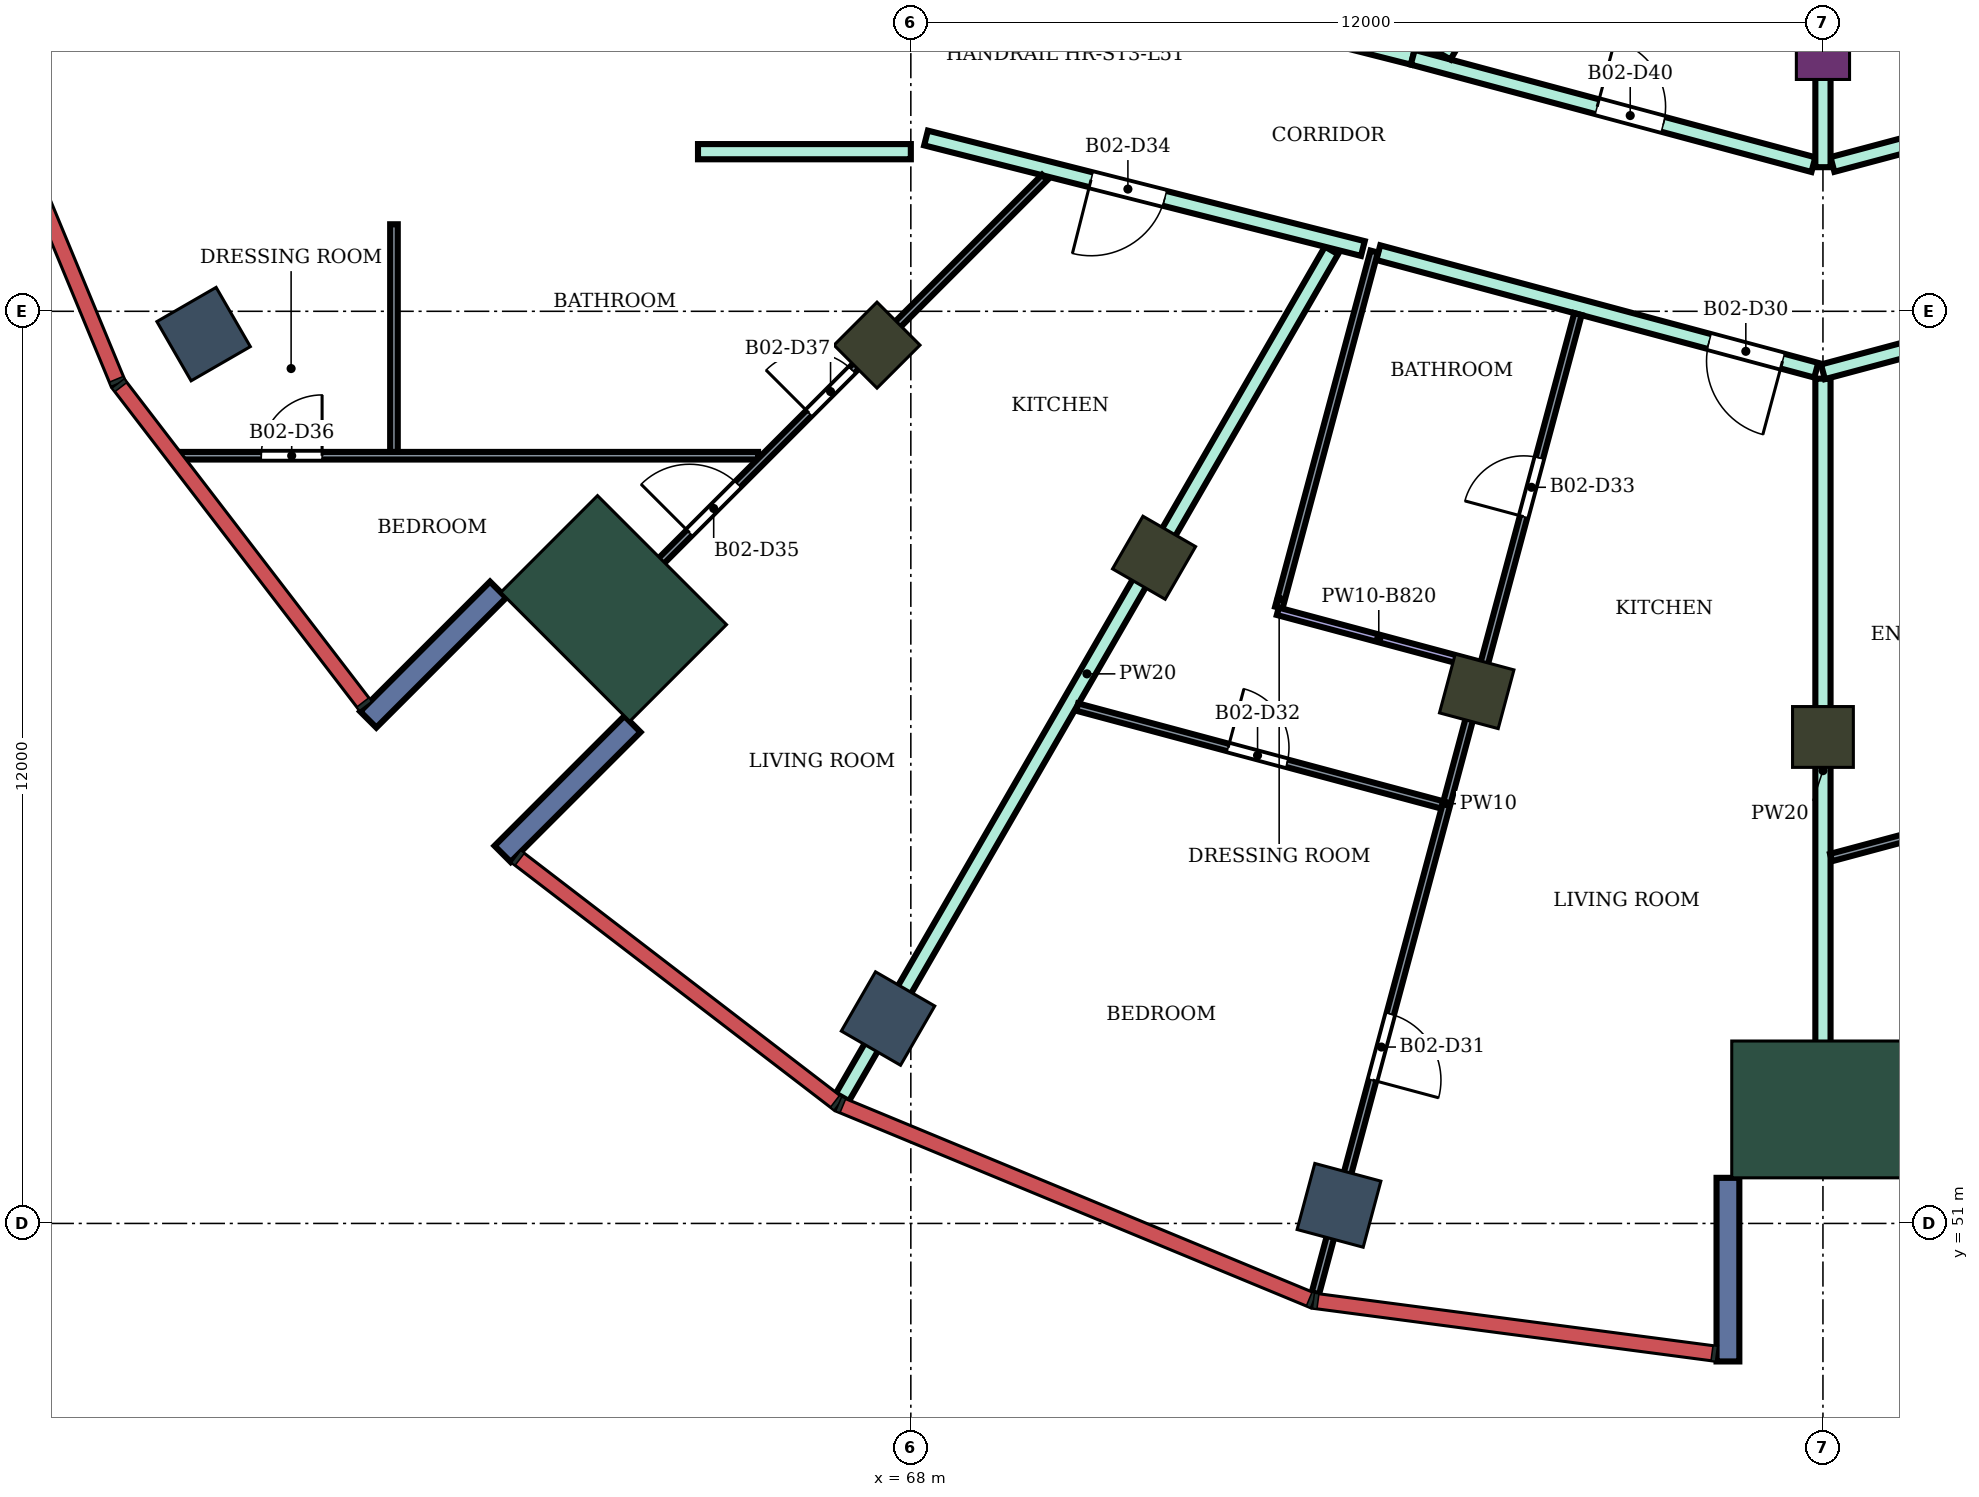
"""IFC4 building model, lengths in metres.
Left out: names, types, materials, properties, quantities, classifications, styles, units other than length and angle.
Written with IfcOpenShell. Run it as: python <this file> out.ifc"""

import sys

from ifc_helpers import new_model, si_unit, direction, frame, frame_2d, origin, origin_2d, place, context, subcontext, project, spatial, rectangle, extrude, element, fill, save


model = new_model("IFC4")
c1 = context("Model", 3, precision=1e-05, world=origin(), true_north=direction((0.0, 1.0)))
c2 = subcontext(c1, "Body", "Model", "MODEL_VIEW")
j1 = project(units=[si_unit("LENGTHUNIT", "METRE"), si_unit("PLANEANGLEUNIT", "RADIAN")], contexts=[c1])
p1 = place(None, origin())
s1 = spatial("IfcSite", under=j1, at=p1, CompositionType="ELEMENT")
p2 = place(p1, origin())
s2 = spatial("IfcBuilding", under=s1, at=p2, CompositionType="ELEMENT")
p3 = place(p2, frame((0.0, 0.0, 220.9)))
s3 = spatial("IfcBuildingStorey", under=s2, at=p3, CompositionType="ELEMENT", Elevation=220.9)
for number, where, z_axis, x_axis in (
    (1, (58.696, 62.7, 0.0), (0.0, 0.0, 1.0), (-0.866, -0.5, 0.0)),
    (2, (67.7, 53.696, 0.0), (0.0, 0.0, 1.0), (-0.5, -0.866, 0.0)),
    (3, (73.633, 51.238, 0.0), (0.0, 0.0, 1.0), (-0.259, -0.966, 0.0)),
):
    element("IfcColumn", number, at=place(p3, frame(where, z_axis=z_axis, x_axis=x_axis)), inside=s3, PredefinedType="COLUMN", context=c2, shape_type="SweptSolid", body=[
        extrude(rectangle(XDim=0.9, YDim=0.9, at=origin_2d()), origin(), (0.0, 0.0, 1.0), 4.2),
    ])
for number, where, z_axis, x_axis in (
    (4, (67.555, 62.555, 0.0), (0.0, 0.0, 1.0), (-0.707, -0.707, 0.0)),
    (5, (71.2, 59.758, 0.0), (0.0, 0.0, 1.0), (-0.5, -0.866, 0.0)),
    (6, (75.445, 58.0, 0.0), (0.0, 0.0, 1.0), (-0.259, -0.966, 0.0)),
    (7, (80.0, 57.4, 0.0), (0.0, 0.0, 1.0), (0.0, -1.0, 0.0)),
):
    element("IfcColumn", number, at=place(p3, frame(where, z_axis=z_axis, x_axis=x_axis)), inside=s3, PredefinedType="COLUMN", context=c2, shape_type="SweptSolid", body=[
        extrude(rectangle(XDim=0.8, YDim=0.8, at=origin_2d()), origin(), (0.0, 0.0, 1.0), 4.2),
    ])
p4 = place(p3, frame((80.0, 66.4, 0.0), z_axis=(0.0, 0.0, 1.0), x_axis=(0.0, -1.0, 0.0)))
e8 = element("IfcColumn", 8, at=p4, inside=s3, PredefinedType="COLUMN", context=c2, shape_type="SweptSolid", body=[
    extrude(rectangle(XDim=0.7, YDim=0.7, at=origin_2d()), origin(), (0.0, 0.0, 1.0), 4.2),
])
for number, where, z_axis, x_axis in (
    (9, (64.09, 59.09, 0.0), (0.0, 0.0, 1.0), (-0.707, -0.707, 0.0)),
    (10, (80.0, 52.5, 0.0), (0.0, 0.0, 1.0), (0.0, -1.0, 0.0)),
):
    element("IfcColumn", number, at=place(p3, frame(where, z_axis=z_axis, x_axis=x_axis)), inside=s3, PredefinedType="COLUMN", context=c2, shape_type="SweptSolid", body=[
        extrude(rectangle(XDim=1.8, YDim=2.4, at=origin_2d()), origin(), (0.0, 0.0, 1.0), 4.2),
    ])
for number, where, z_axis, x_axis in (
    (11, (62.57, 59.338, 0.0), (0.0, 0.0, 1.0), (-0.707, -0.707, 0.0)),
    (12, (64.338, 57.57, 0.0), (0.0, 0.0, 1.0), (-0.707, -0.707, 0.0)),
    (13, (78.75, 51.6, 0.0), (0.0, 0.0, 1.0), (0.0, -1.0, 0.0)),
):
    element("IfcWall", number, at=place(p3, frame(where, z_axis=z_axis, x_axis=x_axis)), inside=s3, PredefinedType="NOTDEFINED", context=c2, shape_type="SweptSolid", body=[
        extrude(rectangle(XDim=2.416, YDim=0.3, at=frame_2d((1.208, 0.0))), origin(), (0.0, 0.0, 1.0), 4.2),
    ])
p5 = place(p3, frame((65.2, 65.1, 0.0), z_axis=(0.0, 0.0, 1.0), x_axis=(1.0, 0.0, 0.0)))
e14 = element("IfcWall", 14, at=p5, inside=s3, PredefinedType="PARTITIONING", context=c2, shape_type="SweptSolid", body=[
    extrude(rectangle(XDim=2.8, YDim=0.2, at=frame_2d((1.4, 0.0))), origin(), (0.0, 0.0, 1.0), 3.75),
])
p6 = place(p3, frame((67.1, 52.659, 0.0), z_axis=(0.0, 0.0, 1.0), x_axis=(0.500128690501, 0.865951091539, 0.0)))
e15 = element("IfcWall", 15, at=p6, inside=s3, PredefinedType="PARTITIONING", context=c2, shape_type="SweptSolid", body=[
    extrude(rectangle(XDim=12.866, YDim=0.2, at=frame_2d((6.433, 0.0))), origin(), (0.0, 0.0, 1.0), 3.75),
])
p7 = place(p3, frame((68.2, 65.28, 0.0), z_axis=(0.0, 0.0, 1.0), x_axis=(0.969450596516, -0.245286650503, 0.0)))
e16 = element("IfcWall", 16, at=p7, inside=s3, PredefinedType="PARTITIONING", context=c2, shape_type="SweptSolid", body=[
    extrude(rectangle(XDim=5.928, YDim=0.2, at=frame_2d((2.964, 0.0))), origin(), (0.0, 0.0, 1.0), 3.75),
])
p8 = place(p7, frame((2.24, 0.0, 0.0)))
e17 = element("IfcOpeningElement", 17, at=p8, cuts=e16, PredefinedType="OPENING", context=c2, shape_type="SweptSolid", body=[
    extrude(rectangle(XDim=1.0, YDim=2.1, at=frame_2d((0.5, 1.05))), frame((0.0, 0.11, 0.0), z_axis=(0.0, -1.0, 0.0), x_axis=(1.0, 0.0, 0.0)), (0.0, 0.0, 1.0), 0.22),
])
p9 = place(p3, frame((72.1, 66.975, 0.0), z_axis=(0.0, 0.0, 1.0), x_axis=(0.969471314457, -0.245204752086, 0.0)))
e18 = element("IfcWall", 18, at=p9, inside=s3, PredefinedType="PARTITIONING", context=c2, shape_type="SweptSolid", body=[
    extrude(rectangle(XDim=2.582, YDim=0.2, at=frame_2d((1.291, 0.0))), origin(), (0.0, 0.0, 1.0), 3.75),
])
p10 = place(p9, frame((0.841, 0.0, 0.0)))
e19 = element("IfcOpeningElement", 19, at=p10, cuts=e18, PredefinedType="OPENING", context=c2, shape_type="SweptSolid", body=[
    extrude(rectangle(XDim=0.9, YDim=2.1, at=frame_2d((0.45, 1.05))), frame((0.0, 0.11, 0.0), z_axis=(0.0, -1.0, 0.0), x_axis=(1.0, 0.0, 0.0)), (0.0, 0.0, 1.0), 0.22),
])
p11 = place(p3, frame((74.15, 63.772, 0.0), z_axis=(0.0, 0.0, 1.0), x_axis=(0.965807109237, -0.259261697417, 0.0)))
e20 = element("IfcWall", 20, at=p11, inside=s3, PredefinedType="PARTITIONING", context=c2, shape_type="SweptSolid", body=[
    extrude(rectangle(XDim=5.967, YDim=0.2, at=frame_2d((2.983, 0.0))), origin(), (0.0, 0.0, 1.0), 3.75),
])
p12 = place(p11, frame((4.507, 0.0, 0.0)))
e21 = element("IfcOpeningElement", 21, at=p12, cuts=e20, PredefinedType="OPENING", context=c2, shape_type="SweptSolid", body=[
    extrude(rectangle(XDim=1.0, YDim=2.1, at=frame_2d((0.5, 1.05))), frame((0.0, 0.11, 0.0), z_axis=(0.0, -1.0, 0.0), x_axis=(1.0, 0.0, 0.0)), (0.0, 0.0, 1.0), 0.22),
])
p13 = place(p3, frame((74.603, 66.342, 0.0), z_axis=(0.0, 0.0, 1.0), x_axis=(0.965920893652, -0.258837453254, 0.0)))
e22 = element("IfcWall", 22, at=p13, inside=s3, PredefinedType="PARTITIONING", context=c2, shape_type="SweptSolid", body=[
    extrude(rectangle(XDim=5.458, YDim=0.2, at=frame_2d((2.729, 0.0))), origin(), (0.0, 0.0, 1.0), 3.75),
])
p14 = place(p13, frame((2.512, 0.0, 0.0)))
e23 = element("IfcOpeningElement", 23, at=p14, cuts=e22, PredefinedType="OPENING", context=c2, shape_type="SweptSolid", body=[
    extrude(rectangle(XDim=0.9, YDim=2.1, at=frame_2d((0.45, 1.05))), frame((0.0, 0.11, 0.0), z_axis=(0.0, -1.0, 0.0), x_axis=(1.0, 0.0, 0.0)), (0.0, 0.0, 1.0), 0.22),
])
p15 = place(p3, frame((75.014, 66.362, 0.0), z_axis=(0.0, 0.0, 1.0), x_axis=(0.500143511652, 0.865942531438, 0.0)))
e24 = element("IfcWall", 24, at=p15, inside=s3, PredefinedType="PARTITIONING", context=c2, shape_type="SweptSolid", body=[
    extrude(rectangle(XDim=2.275, YDim=0.2, at=frame_2d((1.138, 0.0))), origin(), (0.0, 0.0, 1.0), 3.75),
])
p16 = place(p3, frame((80.125, 64.932, 0.0), z_axis=(0.0, 0.0, 1.0), x_axis=(0.966236955806, 0.257655089674, 0.0)))
e25 = element("IfcWall", 25, at=p16, inside=s3, PredefinedType="PARTITIONING", context=c2, shape_type="SweptSolid", body=[
    extrude(rectangle(XDim=8.039, YDim=0.2, at=frame_2d((4.02, 0.0))), origin(), (0.0, 0.0, 1.0), 3.75),
])
p17 = place(p16, frame((6.298, 0.0, 0.0)))
e26 = element("IfcOpeningElement", 26, at=p17, cuts=e25, PredefinedType="OPENING", context=c2, shape_type="SweptSolid", body=[
    extrude(rectangle(XDim=0.9, YDim=2.1, at=frame_2d((0.45, 1.05))), frame((0.0, 0.11, 0.0), z_axis=(0.0, -1.0, 0.0), x_axis=(1.0, 0.0, 0.0)), (0.0, 0.0, 1.0), 0.22),
])
p18 = place(p16, frame((2.045, 0.0, 0.0)))
e27 = element("IfcOpeningElement", 27, at=p18, cuts=e25, PredefinedType="OPENING", context=c2, shape_type="SweptSolid", body=[
    extrude(rectangle(XDim=0.9, YDim=2.1, at=frame_2d((0.45, 1.05))), frame((0.0, 0.11, 0.0), z_axis=(0.0, -1.0, 0.0), x_axis=(1.0, 0.0, 0.0)), (0.0, 0.0, 1.0), 0.22),
])
p19 = place(p3, frame((80.0, 51.8, 0.0), z_axis=(0.0, 0.0, 1.0), x_axis=(0.0, 1.0, 0.0)))
e28 = element("IfcWall", 28, at=p19, inside=s3, PredefinedType="PARTITIONING", context=c2, shape_type="SweptSolid", body=[
    extrude(rectangle(XDim=10.314, YDim=0.2, at=frame_2d((5.157, 0.0))), origin(), (0.0, 0.0, 1.0), 3.75),
])
p20 = place(p3, frame((80.0, 62.204, 0.0), z_axis=(0.0, 0.0, 1.0), x_axis=(0.965938139786, 0.258773086132, 0.0)))
e29 = element("IfcWall", 29, at=p20, inside=s3, PredefinedType="PARTITIONING", context=c2, shape_type="SweptSolid", body=[
    extrude(rectangle(XDim=6.266, YDim=0.2, at=frame_2d((3.133, 0.0))), origin(), (0.0, 0.0, 1.0), 3.75),
])
p21 = place(p3, frame((80.0, 64.896, 0.0), z_axis=(0.0, 0.0, 1.0), x_axis=(0.0, 1.0, 0.0)))
e30 = element("IfcWall", 30, at=p21, inside=s3, PredefinedType="PARTITIONING", context=c2, shape_type="SweptSolid", body=[
    extrude(rectangle(XDim=2.405, YDim=0.2, at=frame_2d((1.203, 0.0))), origin(), (0.0, 0.0, 1.0), 3.75),
])
p22 = place(p3, frame((58.379, 61.1, 0.0), z_axis=(0.0, 0.0, 1.0), x_axis=(1.0, 0.0, 0.0)))
e31 = element("IfcWall", 31, at=p22, inside=s3, PredefinedType="PARTITIONING", context=c2, shape_type="SweptSolid", body=[
    extrude(rectangle(XDim=7.611, YDim=0.1, at=frame_2d((3.806, 0.0))), origin(), (0.0, 0.0, 1.0), 3.75),
])
p23 = place(p22, frame((1.075, 0.0, 0.0)))
e32 = element("IfcOpeningElement", 32, at=p23, cuts=e31, PredefinedType="OPENING", context=c2, shape_type="SweptSolid", body=[
    extrude(rectangle(XDim=0.8, YDim=2.1, at=frame_2d((0.4, 1.05))), frame((0.0, 0.06, 0.0), z_axis=(0.0, -1.0, 0.0), x_axis=(1.0, 0.0, 0.0)), (0.0, 0.0, 1.0), 0.12),
])
p24 = place(p3, frame((61.2, 61.15, 0.0), z_axis=(0.0, 0.0, 1.0), x_axis=(0.0, 1.0, 0.0)))
e33 = element("IfcWall", 33, at=p24, inside=s3, PredefinedType="PARTITIONING", context=c2, shape_type="SweptSolid", body=[
    extrude(rectangle(XDim=2.995, YDim=0.1, at=frame_2d((1.498, 0.0))), origin(), (0.0, 0.0, 1.0), 3.75),
])
p25 = place(p3, frame((63.596, 58.596, 0.0), z_axis=(0.0, 0.0, 1.0), x_axis=(0.707106781187, 0.707106781187, 0.0)))
e34 = element("IfcWall", 34, at=p25, inside=s3, PredefinedType="PARTITIONING", context=c2, shape_type="SweptSolid", body=[
    extrude(rectangle(XDim=8.719, YDim=0.1, at=frame_2d((4.359, 0.0))), origin(), (0.0, 0.0, 1.0), 3.75),
])
p26 = place(p25, frame((2.111, 0.0, 0.0)))
e35 = element("IfcOpeningElement", 35, at=p26, cuts=e34, PredefinedType="OPENING", context=c2, shape_type="SweptSolid", body=[
    extrude(rectangle(XDim=0.9, YDim=2.1, at=frame_2d((0.45, 1.05))), frame((0.0, 0.06, 0.0), z_axis=(0.0, -1.0, 0.0), x_axis=(1.0, 0.0, 0.0)), (0.0, 0.0, 1.0), 0.12),
])
p27 = place(p25, frame((4.335, 0.0, 0.0)))
e36 = element("IfcOpeningElement", 36, at=p27, cuts=e34, PredefinedType="OPENING", context=c2, shape_type="SweptSolid", body=[
    extrude(rectangle(XDim=0.8, YDim=2.1, at=frame_2d((0.4, 1.05))), frame((0.0, 0.06, 0.0), z_axis=(0.0, -1.0, 0.0), x_axis=(1.0, 0.0, 0.0)), (0.0, 0.0, 1.0), 0.12),
])
p28 = place(p3, frame((70.188, 57.793, 0.0), z_axis=(0.0, 0.0, 1.0), x_axis=(0.965913212633, -0.258866115322, 0.0)))
e37 = element("IfcWall", 37, at=p28, inside=s3, PredefinedType="PARTITIONING", context=c2, shape_type="SweptSolid", body=[
    extrude(rectangle(XDim=4.974, YDim=0.1, at=frame_2d((2.487, 0.0))), origin(), (0.0, 0.0, 1.0), 3.75),
])
p29 = place(p28, frame((2.057, 0.0, 0.0)))
e38 = element("IfcOpeningElement", 38, at=p29, cuts=e37, PredefinedType="OPENING", context=c2, shape_type="SweptSolid", body=[
    extrude(rectangle(XDim=0.8, YDim=2.1, at=frame_2d((0.4, 1.05))), frame((0.0, 0.06, 0.0), z_axis=(0.0, -1.0, 0.0), x_axis=(1.0, 0.0, 0.0)), (0.0, 0.0, 1.0), 0.12),
])
p30 = place(p3, frame((72.841, 59.101, 0.0), z_axis=(0.0, 0.0, 1.0), x_axis=(0.258799830155, 0.965930974714, 0.0)))
e39 = element("IfcWall", 39, at=p30, inside=s3, PredefinedType="PARTITIONING", context=c2, shape_type="SweptSolid", body=[
    extrude(rectangle(XDim=4.85, YDim=0.1, at=frame_2d((2.425, 0.0))), origin(), (0.0, 0.0, 1.0), 3.75),
])
p31 = place(p3, frame((72.828, 59.053, 0.0), z_axis=(0.0, 0.0, 1.0), x_axis=(0.965899705866, -0.25891650818, 0.0)))
e40 = element("IfcWall", 40, at=p31, inside=s3, PredefinedType="PARTITIONING", context=c2, shape_type="SweptSolid", body=[
    extrude(rectangle(XDim=2.75, YDim=0.1, at=frame_2d((1.375, 0.0))), origin(), (0.0, 0.0, 1.0), 3.38),
])
p32 = place(p3, frame((73.323, 50.081, 0.0), z_axis=(0.0, 0.0, 1.0), x_axis=(0.258961147073, 0.965887738977, 0.0)))
e41 = element("IfcWall", 41, at=p32, inside=s3, PredefinedType="PARTITIONING", context=c2, shape_type="SweptSolid", body=[
    extrude(rectangle(XDim=13.338, YDim=0.1, at=frame_2d((6.669, 0.0))), origin(), (0.0, 0.0, 1.0), 3.75),
])
p33 = place(p32, frame((2.904, 0.0, 0.0)))
e42 = element("IfcOpeningElement", 42, at=p33, cuts=e41, PredefinedType="OPENING", context=c2, shape_type="SweptSolid", body=[
    extrude(rectangle(XDim=0.9, YDim=2.1, at=frame_2d((0.45, 1.05))), frame((0.0, 0.06, 0.0), z_axis=(0.0, -1.0, 0.0), x_axis=(1.0, 0.0, 0.0)), (0.0, 0.0, 1.0), 0.12),
])
p34 = place(p32, frame((10.578, 0.0, 0.0)))
e43 = element("IfcOpeningElement", 43, at=p34, cuts=e41, PredefinedType="OPENING", context=c2, shape_type="SweptSolid", body=[
    extrude(rectangle(XDim=0.8, YDim=2.1, at=frame_2d((0.4, 1.05))), frame((0.0, 0.06, 0.0), z_axis=(0.0, -1.0, 0.0), x_axis=(1.0, 0.0, 0.0)), (0.0, 0.0, 1.0), 0.12),
])
p35 = place(p3, frame((80.106, 55.813, 0.0), z_axis=(0.0, 0.0, 1.0), x_axis=(0.965936279421, 0.25878003033, 0.0)))
e44 = element("IfcWall", 44, at=p35, inside=s3, PredefinedType="PARTITIONING", context=c2, shape_type="SweptSolid", body=[
    extrude(rectangle(XDim=4.813, YDim=0.1, at=frame_2d((2.407, 0.0))), origin(), (0.0, 0.0, 1.0), 3.75),
])
p36 = place(p35, frame((1.977, 0.0, 0.0)))
e45 = element("IfcOpeningElement", 45, at=p36, cuts=e44, PredefinedType="OPENING", context=c2, shape_type="SweptSolid", body=[
    extrude(rectangle(XDim=0.8, YDim=2.1, at=frame_2d((0.4, 1.05))), frame((0.0, 0.06, 0.0), z_axis=(0.0, -1.0, 0.0), x_axis=(1.0, 0.0, 0.0)), (0.0, 0.0, 1.0), 0.12),
])
p37 = place(p12, frame((1.0, 0.0, 0.0), z_axis=(0.0, 0.0, 1.0), x_axis=(-1.0, 0.0, 0.0)))
e46 = element("IfcDoor", 46, at=p37, inside=s3, OperationType="SINGLE_SWING_LEFT", PredefinedType="DOOR", context=c2, shape_type="SweptSolid", body=[
    extrude(rectangle(XDim=1.0, YDim=2.1, at=frame_2d((0.5, 1.05))), frame((0.0, 0.025, 0.0), z_axis=(0.0, -1.0, 0.0), x_axis=(1.0, 0.0, 0.0)), (0.0, 0.0, 1.0), 0.05),
])
fill(e21, e46)
p38 = place(p33, frame((0.9, 0.0, 0.0), z_axis=(0.0, 0.0, 1.0), x_axis=(-1.0, 0.0, 0.0)))
e47 = element("IfcDoor", 47, at=p38, inside=s3, OperationType="SINGLE_SWING_RIGHT", PredefinedType="DOOR", context=c2, shape_type="SweptSolid", body=[
    extrude(rectangle(XDim=0.9, YDim=2.1, at=frame_2d((0.45, 1.05))), frame((0.0, 0.025, 0.0), z_axis=(0.0, -1.0, 0.0), x_axis=(1.0, 0.0, 0.0)), (0.0, 0.0, 1.0), 0.05),
])
fill(e42, e47)
p39 = place(p29, origin())
e48 = element("IfcDoor", 48, at=p39, inside=s3, OperationType="SINGLE_SWING_LEFT", PredefinedType="DOOR", context=c2, shape_type="SweptSolid", body=[
    extrude(rectangle(XDim=0.8, YDim=2.1, at=frame_2d((0.4, 1.05))), frame((0.0, 0.025, 0.0), z_axis=(0.0, -1.0, 0.0), x_axis=(1.0, 0.0, 0.0)), (0.0, 0.0, 1.0), 0.05),
])
fill(e38, e48)
p40 = place(p34, origin())
e49 = element("IfcDoor", 49, at=p40, inside=s3, OperationType="SINGLE_SWING_LEFT", PredefinedType="DOOR", context=c2, shape_type="SweptSolid", body=[
    extrude(rectangle(XDim=0.8, YDim=2.1, at=frame_2d((0.4, 1.05))), frame((0.0, 0.025, 0.0), z_axis=(0.0, -1.0, 0.0), x_axis=(1.0, 0.0, 0.0)), (0.0, 0.0, 1.0), 0.05),
])
fill(e43, e49)
p41 = place(p8, frame((1.0, 0.0, 0.0), z_axis=(0.0, 0.0, 1.0), x_axis=(-1.0, 0.0, 0.0)))
e50 = element("IfcDoor", 50, at=p41, inside=s3, OperationType="SINGLE_SWING_RIGHT", PredefinedType="DOOR", context=c2, shape_type="SweptSolid", body=[
    extrude(rectangle(XDim=1.0, YDim=2.1, at=frame_2d((0.5, 1.05))), frame((0.0, 0.025, 0.0), z_axis=(0.0, -1.0, 0.0), x_axis=(1.0, 0.0, 0.0)), (0.0, 0.0, 1.0), 0.05),
])
fill(e17, e50)
p42 = place(p26, origin())
e51 = element("IfcDoor", 51, at=p42, inside=s3, OperationType="SINGLE_SWING_LEFT", PredefinedType="DOOR", context=c2, shape_type="SweptSolid", body=[
    extrude(rectangle(XDim=0.9, YDim=2.1, at=frame_2d((0.45, 1.05))), frame((0.0, 0.025, 0.0), z_axis=(0.0, -1.0, 0.0), x_axis=(1.0, 0.0, 0.0)), (0.0, 0.0, 1.0), 0.05),
])
fill(e35, e51)
p43 = place(p23, origin())
e52 = element("IfcDoor", 52, at=p43, inside=s3, OperationType="SINGLE_SWING_RIGHT", PredefinedType="DOOR", context=c2, shape_type="SweptSolid", body=[
    extrude(rectangle(XDim=0.8, YDim=2.1, at=frame_2d((0.4, 1.05))), frame((0.0, 0.025, 0.0), z_axis=(0.0, -1.0, 0.0), x_axis=(1.0, 0.0, 0.0)), (0.0, 0.0, 1.0), 0.05),
])
fill(e32, e52)
p44 = place(p27, origin())
e53 = element("IfcDoor", 53, at=p44, inside=s3, OperationType="SINGLE_SWING_LEFT", PredefinedType="DOOR", context=c2, shape_type="SweptSolid", body=[
    extrude(rectangle(XDim=0.8, YDim=2.1, at=frame_2d((0.4, 1.05))), frame((0.0, 0.025, 0.0), z_axis=(0.0, -1.0, 0.0), x_axis=(1.0, 0.0, 0.0)), (0.0, 0.0, 1.0), 0.05),
])
fill(e36, e53)
p45 = place(p14, origin())
e54 = element("IfcDoor", 54, at=p45, inside=s3, OperationType="SINGLE_SWING_LEFT", PredefinedType="DOOR", context=c2, shape_type="SweptSolid", body=[
    extrude(rectangle(XDim=0.9, YDim=2.1, at=frame_2d((0.45, 1.05))), frame((0.0, 0.025, 0.0), z_axis=(0.0, -1.0, 0.0), x_axis=(1.0, 0.0, 0.0)), (0.0, 0.0, 1.0), 0.05),
])
fill(e23, e54)
save(model, sys.argv[1])
